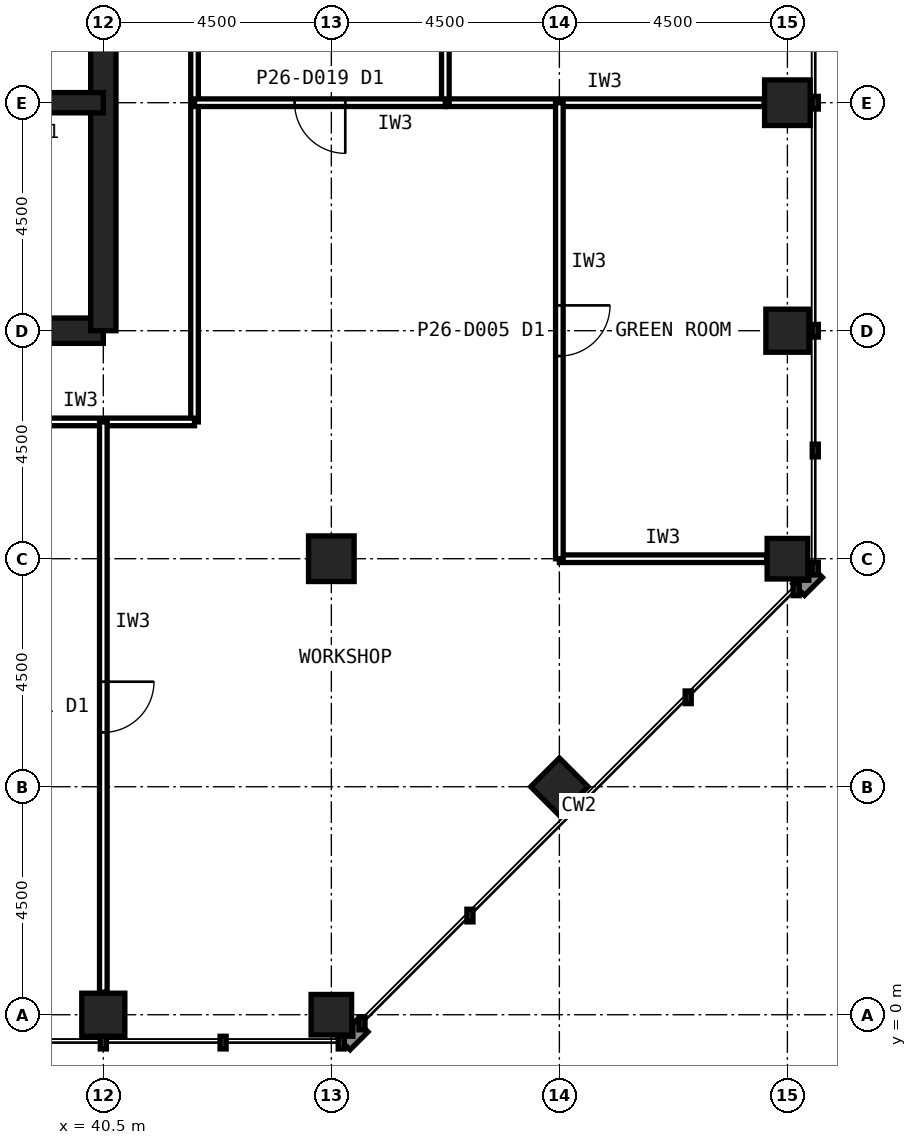
"""IFC4 building model, lengths in metres.
Left out: names, types, materials, properties, quantities, classifications, styles, units other than length and angle.
Written with IfcOpenShell. Run it as: python <this file> out.ifc"""

import sys

from ifc_helpers import new_model, si_unit, direction, frame, frame_2d, origin, origin_2d, place, context, subcontext, project, spatial, rectangle, hollow_rectangle, extrude, element, fill, save


model = new_model("IFC4")
c1 = context("Model", 3, precision=1e-05, world=origin(), true_north=direction((0.0, 1.0)))
c2 = subcontext(c1, "Body", "Model", "MODEL_VIEW")
j1 = project(units=[si_unit("LENGTHUNIT", "METRE"), si_unit("PLANEANGLEUNIT", "RADIAN")], contexts=[c1])
p1 = place(None, origin())
s1 = spatial("IfcSite", under=j1, at=p1, CompositionType="ELEMENT")
p2 = place(p1, origin())
s2 = spatial("IfcBuilding", under=s1, at=p2, CompositionType="ELEMENT")
p3 = place(p2, frame((0.0, 0.0, 115.6)))
s3 = spatial("IfcBuildingStorey", under=s2, at=p3, CompositionType="ELEMENT", Elevation=115.6)
p4 = place(p3, frame((40.5, 0.0, 0.0), z_axis=(0.0, 0.0, 1.0), x_axis=(1.0, 0.0, 0.0)))
e1 = element("IfcColumn", 1, at=p4, inside=s3, PredefinedType="COLUMN", context=c2, shape_type="SweptSolid", body=[
    extrude(hollow_rectangle(XDim=0.85, YDim=0.85, WallThickness=0.05, at=origin_2d()), origin(), (0.0, 0.0, 1.0), 4.0),
])
for number, where, z_axis, x_axis in (
    (2, (45.0, 0.0, 0.0), (0.0, 0.0, 1.0), (1.0, 0.0, 0.0)),
    (3, (54.0, 9.0, 0.0), (0.0, 0.0, 1.0), (1.0, 0.0, 0.0)),
):
    element("IfcColumn", number, at=place(p3, frame(where, z_axis=z_axis, x_axis=x_axis)), inside=s3, PredefinedType="COLUMN", context=c2, shape_type="SweptSolid", body=[
        extrude(hollow_rectangle(XDim=0.8, YDim=0.8, WallThickness=0.045, at=origin_2d()), origin(), (0.0, 0.0, 1.0), 4.0),
    ])
p5 = place(p3, frame((54.0, 13.5, 0.0), z_axis=(0.0, 0.0, 1.0), x_axis=(1.0, 0.0, 0.0)))
e4 = element("IfcColumn", 4, at=p5, inside=s3, PredefinedType="COLUMN", context=c2, shape_type="SweptSolid", body=[
    extrude(hollow_rectangle(XDim=0.85, YDim=0.85, WallThickness=0.05, at=origin_2d()), origin(), (0.0, 0.0, 1.0), 4.0),
])
p6 = place(p3, frame((54.0, 18.0, 0.0), z_axis=(0.0, 0.0, 1.0), x_axis=(1.0, 0.0, 0.0)))
e5 = element("IfcColumn", 5, at=p6, inside=s3, PredefinedType="COLUMN", context=c2, shape_type="SweptSolid", body=[
    extrude(hollow_rectangle(XDim=0.9, YDim=0.9, WallThickness=0.063, at=origin_2d()), origin(), (0.0, 0.0, 1.0), 4.0),
])
p7 = place(p3, frame((49.5, 4.5, 0.0), z_axis=(0.0, 0.0, 1.0), x_axis=(0.707106781187, 0.707106781187, 0.0)))
e6 = element("IfcColumn", 6, at=p7, inside=s3, PredefinedType="COLUMN", context=c2, shape_type="SweptSolid", body=[
    extrude(hollow_rectangle(XDim=0.8, YDim=0.8, WallThickness=0.045, at=origin_2d()), origin(), (0.0, 0.0, 1.0), 4.0),
])
p8 = place(p3, frame((45.0, 9.0, 0.0), z_axis=(0.0, 0.0, 1.0), x_axis=(1.0, 0.0, 0.0)))
e7 = element("IfcColumn", 7, at=p8, inside=s3, PredefinedType="COLUMN", context=c2, shape_type="SweptSolid", body=[
    extrude(hollow_rectangle(XDim=0.9, YDim=0.9, WallThickness=0.063, at=origin_2d()), origin(), (0.0, 0.0, 1.0), 4.0),
])
p9 = place(p3, frame((13.5, 13.5, 0.0), z_axis=(0.0, 0.0, 1.0), x_axis=(1.0, 0.0, 0.0)))
e8 = element("IfcWall", 8, at=p9, inside=s3, PredefinedType="SHEAR", context=c2, shape_type="SweptSolid", body=[
    extrude(rectangle(XDim=27.0, YDim=0.5, at=frame_2d((13.5, 0.0))), origin(), (0.0, 0.0, 1.0), 4.0),
])
p10 = place(p3, frame((40.5, 13.5, 0.0), z_axis=(0.0, 0.0, 1.0), x_axis=(0.0, 1.0, 0.0)))
e9 = element("IfcWall", 9, at=p10, inside=s3, PredefinedType="SHEAR", context=c2, shape_type="SweptSolid", body=[
    extrude(rectangle(XDim=27.0, YDim=0.5, at=frame_2d((13.5, 0.0))), origin(), (0.0, 0.0, 1.0), 4.0),
])
p11 = place(p10, frame((5.85, 0.0, 0.0)))
e10 = element("IfcOpeningElement", 10, at=p11, cuts=e9, PredefinedType="OPENING", context=c2, shape_type="SweptSolid", body=[
    extrude(rectangle(XDim=1.8, YDim=2.1, at=frame_2d((0.9, 1.05))), frame((0.0, 0.26, 0.0), z_axis=(0.0, -1.0, 0.0), x_axis=(1.0, 0.0, 0.0)), (0.0, 0.0, 1.0), 0.52),
])
p12 = place(p10, frame((19.65, 0.0, 0.0)))
e11 = element("IfcOpeningElement", 11, at=p12, cuts=e9, PredefinedType="OPENING", context=c2, shape_type="SweptSolid", body=[
    extrude(rectangle(XDim=1.2, YDim=2.1, at=frame_2d((0.6, 1.05))), frame((0.0, 0.26, 0.0), z_axis=(0.0, -1.0, 0.0), x_axis=(1.0, 0.0, 0.0)), (0.0, 0.0, 1.0), 0.52),
])
p13 = place(p3, frame((13.5, 18.0, 0.0), z_axis=(0.0, 0.0, 1.0), x_axis=(1.0, 0.0, 0.0)))
e12 = element("IfcWall", 12, at=p13, inside=s3, PredefinedType="SHEAR", context=c2, shape_type="SweptSolid", body=[
    extrude(rectangle(XDim=27.0, YDim=0.4, at=frame_2d((13.5, 0.0))), origin(), (0.0, 0.0, 1.0), 4.0),
])
p14 = place(p13, frame((24.3, 0.0, 0.0)))
e13 = element("IfcOpeningElement", 13, at=p14, cuts=e12, PredefinedType="OPENING", context=c2, shape_type="SweptSolid", body=[
    extrude(rectangle(XDim=0.9, YDim=2.1, at=frame_2d((0.45, 1.05))), frame((0.0, 0.21, 0.0), z_axis=(0.0, -1.0, 0.0), x_axis=(1.0, 0.0, 0.0)), (0.0, 0.0, 1.0), 0.42),
])
p15 = place(p13, frame((5.45, 0.0, 0.0)))
e14 = element("IfcOpeningElement", 14, at=p15, cuts=e12, PredefinedType="OPENING", context=c2, shape_type="SweptSolid", body=[
    extrude(rectangle(XDim=1.1, YDim=2.1, at=frame_2d((0.55, 1.05))), frame((0.0, 0.21, 0.0), z_axis=(0.0, -1.0, 0.0), x_axis=(1.0, 0.0, 0.0)), (0.0, 0.0, 1.0), 0.42),
])
p16 = place(p13, frame((8.45, 0.0, 0.0)))
e15 = element("IfcOpeningElement", 15, at=p16, cuts=e12, PredefinedType="OPENING", context=c2, shape_type="SweptSolid", body=[
    extrude(rectangle(XDim=1.1, YDim=2.1, at=frame_2d((0.55, 1.05))), frame((0.0, 0.21, 0.0), z_axis=(0.0, -1.0, 0.0), x_axis=(1.0, 0.0, 0.0)), (0.0, 0.0, 1.0), 0.42),
])
p17 = place(p13, frame((11.45, 0.0, 0.0)))
e16 = element("IfcOpeningElement", 16, at=p17, cuts=e12, PredefinedType="OPENING", context=c2, shape_type="SweptSolid", body=[
    extrude(rectangle(XDim=1.1, YDim=2.1, at=frame_2d((0.55, 1.05))), frame((0.0, 0.21, 0.0), z_axis=(0.0, -1.0, 0.0), x_axis=(1.0, 0.0, 0.0)), (0.0, 0.0, 1.0), 0.42),
])
p18 = place(p13, frame((14.45, 0.0, 0.0)))
e17 = element("IfcOpeningElement", 17, at=p18, cuts=e12, PredefinedType="OPENING", context=c2, shape_type="SweptSolid", body=[
    extrude(rectangle(XDim=1.1, YDim=2.1, at=frame_2d((0.55, 1.05))), frame((0.0, 0.21, 0.0), z_axis=(0.0, -1.0, 0.0), x_axis=(1.0, 0.0, 0.0)), (0.0, 0.0, 1.0), 0.42),
])
p19 = place(p13, frame((17.45, 0.0, 0.0)))
e18 = element("IfcOpeningElement", 18, at=p19, cuts=e12, PredefinedType="OPENING", context=c2, shape_type="SweptSolid", body=[
    extrude(rectangle(XDim=1.1, YDim=2.1, at=frame_2d((0.55, 1.05))), frame((0.0, 0.21, 0.0), z_axis=(0.0, -1.0, 0.0), x_axis=(1.0, 0.0, 0.0)), (0.0, 0.0, 1.0), 0.42),
])
p20 = place(p13, frame((20.45, 0.0, 0.0)))
e19 = element("IfcOpeningElement", 19, at=p20, cuts=e12, PredefinedType="OPENING", context=c2, shape_type="SweptSolid", body=[
    extrude(rectangle(XDim=1.1, YDim=2.1, at=frame_2d((0.55, 1.05))), frame((0.0, 0.21, 0.0), z_axis=(0.0, -1.0, 0.0), x_axis=(1.0, 0.0, 0.0)), (0.0, 0.0, 1.0), 0.42),
])
p21 = place(p13, frame((1.6, 0.0, 0.0)))
e20 = element("IfcOpeningElement", 20, at=p21, cuts=e12, PredefinedType="OPENING", context=c2, shape_type="SweptSolid", body=[
    extrude(rectangle(XDim=1.3, YDim=2.2, at=frame_2d((0.65, 1.1))), frame((0.0, 0.21, 0.0), z_axis=(0.0, -1.0, 0.0), x_axis=(1.0, 0.0, 0.0)), (0.0, 0.0, 1.0), 0.42),
])
p22 = place(p3, frame((42.3, 11.7, 0.0), z_axis=(0.0, 0.0, 1.0), x_axis=(0.0, 1.0, 0.0)))
e21 = element("IfcWall", 21, at=p22, inside=s3, PredefinedType="PARTITIONING", context=c2, shape_type="SweptSolid", body=[
    extrude(rectangle(XDim=28.8, YDim=0.15, at=frame_2d((14.4, 0.0))), origin(), (0.0, 0.0, 1.0), 3.84),
])
p23 = place(p22, frame((13.9, 0.0, 0.0)))
e22 = element("IfcOpeningElement", 22, at=p23, cuts=e21, PredefinedType="OPENING", context=c2, shape_type="SweptSolid", body=[
    extrude(rectangle(XDim=1.0, YDim=2.1, at=frame_2d((0.5, 1.05))), frame((0.0, 0.085, 0.0), z_axis=(0.0, -1.0, 0.0), x_axis=(1.0, 0.0, 0.0)), (0.0, 0.0, 1.0), 0.17),
])
p24 = place(p3, frame((37.8, 11.7, 0.0), z_axis=(0.0, 0.0, 1.0), x_axis=(1.0, 0.0, 0.0)))
e23 = element("IfcWall", 23, at=p24, inside=s3, PredefinedType="PARTITIONING", context=c2, shape_type="SweptSolid", body=[
    extrude(rectangle(XDim=4.5, YDim=0.15, at=frame_2d((2.25, 0.0))), origin(), (0.0, 0.0, 1.0), 3.84),
])
p25 = place(p3, frame((47.25, 18.0, 0.0), z_axis=(0.0, 0.0, 1.0), x_axis=(1.0, 0.0, 0.0)))
e24 = element("IfcWall", 24, at=p25, inside=s3, PredefinedType="PARTITIONING", context=c2, shape_type="SweptSolid", body=[
    extrude(rectangle(XDim=6.29, YDim=0.15, at=frame_2d((3.145, 0.0))), origin(), (0.0, 0.0, 1.0), 2.989),
])
p26 = place(p3, frame((47.25, 27.0, 0.0), z_axis=(0.0, 0.0, 1.0), x_axis=(0.0, -1.0, 0.0)))
e25 = element("IfcWall", 25, at=p26, inside=s3, PredefinedType="PARTITIONING", context=c2, shape_type="SweptSolid", body=[
    extrude(rectangle(XDim=9.0, YDim=0.15, at=frame_2d((4.5, 0.0))), origin(), (0.0, 0.0, 1.0), 3.84),
])
p27 = place(p26, frame((4.0, 0.0, 0.0)))
e26 = element("IfcOpeningElement", 26, at=p27, cuts=e25, PredefinedType="OPENING", context=c2, shape_type="SweptSolid", body=[
    extrude(rectangle(XDim=1.0, YDim=2.1, at=frame_2d((0.5, 1.05))), frame((0.0, 0.085, 0.0), z_axis=(0.0, -1.0, 0.0), x_axis=(1.0, 0.0, 0.0)), (0.0, 0.0, 1.0), 0.17),
])
p28 = place(p3, frame((49.5, 9.0, 0.0), z_axis=(0.0, 0.0, 1.0), x_axis=(1.0, 0.0, 0.0)))
e27 = element("IfcWall", 27, at=p28, inside=s3, PredefinedType="PARTITIONING", context=c2, shape_type="SweptSolid", body=[
    extrude(rectangle(XDim=4.09, YDim=0.15, at=frame_2d((2.045, 0.0))), origin(), (0.0, 0.0, 1.0), 3.229),
])
p29 = place(p3, frame((49.5, 18.0, 0.0), z_axis=(0.0, 0.0, 1.0), x_axis=(0.0, -1.0, 0.0)))
e28 = element("IfcWall", 28, at=p29, inside=s3, PredefinedType="PARTITIONING", context=c2, shape_type="SweptSolid", body=[
    extrude(rectangle(XDim=9.0, YDim=0.15, at=frame_2d((4.5, 0.0))), origin(), (0.0, 0.0, 1.0), 3.84),
])
p30 = place(p29, frame((4.0, 0.0, 0.0)))
e29 = element("IfcOpeningElement", 29, at=p30, cuts=e28, PredefinedType="OPENING", context=c2, shape_type="SweptSolid", body=[
    extrude(rectangle(XDim=1.0, YDim=2.1, at=frame_2d((0.5, 1.05))), frame((0.0, 0.085, 0.0), z_axis=(0.0, -1.0, 0.0), x_axis=(1.0, 0.0, 0.0)), (0.0, 0.0, 1.0), 0.17),
])
p31 = place(p3, frame((47.25, 18.0, 0.0), z_axis=(0.0, 0.0, 1.0), x_axis=(-1.0, 0.0, 0.0)))
e30 = element("IfcWall", 30, at=p31, inside=s3, PredefinedType="PARTITIONING", context=c2, shape_type="SweptSolid", body=[
    extrude(rectangle(XDim=4.95, YDim=0.15, at=frame_2d((2.475, 0.0))), origin(), (0.0, 0.0, 1.0), 2.989),
])
p32 = place(p31, frame((1.975, 0.0, 0.0)))
e31 = element("IfcOpeningElement", 31, at=p32, cuts=e30, PredefinedType="OPENING", context=c2, shape_type="SweptSolid", body=[
    extrude(rectangle(XDim=1.0, YDim=2.1, at=frame_2d((0.5, 1.05))), frame((0.0, 0.085, 0.0), z_axis=(0.0, -1.0, 0.0), x_axis=(1.0, 0.0, 0.0)), (0.0, 0.0, 1.0), 0.17),
])
p33 = place(p3, frame((40.5, 11.7, 0.0), z_axis=(0.0, 0.0, 1.0), x_axis=(0.0, -1.0, 0.0)))
e32 = element("IfcWall", 32, at=p33, inside=s3, PredefinedType="PARTITIONING", context=c2, shape_type="SweptSolid", body=[
    extrude(rectangle(XDim=11.255, YDim=0.15, at=frame_2d((5.627, 0.0))), origin(), (0.0, 0.0, 1.0), 2.989),
])
p34 = place(p33, frame((5.127, 0.0, 0.0)))
e33 = element("IfcOpeningElement", 33, at=p34, cuts=e32, PredefinedType="OPENING", context=c2, shape_type="SweptSolid", body=[
    extrude(rectangle(XDim=1.0, YDim=2.1, at=frame_2d((0.5, 1.05))), frame((0.0, 0.085, 0.0), z_axis=(0.0, -1.0, 0.0), x_axis=(1.0, 0.0, 0.0)), (0.0, 0.0, 1.0), 0.17),
])
p35 = place(p30, origin())
e34 = element("IfcDoor", 34, at=p35, inside=s3, OperationType="SINGLE_SWING_LEFT", PredefinedType="DOOR", context=c2, shape_type="SweptSolid", body=[
    extrude(rectangle(XDim=1.0, YDim=2.1, at=frame_2d((0.5, 1.05))), frame((0.0, 0.025, 0.0), z_axis=(0.0, -1.0, 0.0), x_axis=(1.0, 0.0, 0.0)), (0.0, 0.0, 1.0), 0.05),
])
fill(e29, e34)
p36 = place(p32, origin())
e35 = element("IfcDoor", 35, at=p36, inside=s3, OperationType="SINGLE_SWING_LEFT", PredefinedType="DOOR", context=c2, shape_type="SweptSolid", body=[
    extrude(rectangle(XDim=1.0, YDim=2.1, at=frame_2d((0.5, 1.05))), frame((0.0, 0.025, 0.0), z_axis=(0.0, -1.0, 0.0), x_axis=(1.0, 0.0, 0.0)), (0.0, 0.0, 1.0), 0.05),
])
fill(e31, e35)
p37 = place(p34, origin())
e36 = element("IfcDoor", 36, at=p37, inside=s3, OperationType="SINGLE_SWING_LEFT", PredefinedType="DOOR", context=c2, shape_type="SweptSolid", body=[
    extrude(rectangle(XDim=1.0, YDim=2.1, at=frame_2d((0.5, 1.05))), frame((0.0, 0.025, 0.0), z_axis=(0.0, -1.0, 0.0), x_axis=(1.0, 0.0, 0.0)), (0.0, 0.0, 1.0), 0.05),
])
fill(e33, e36)
save(model, sys.argv[1])
